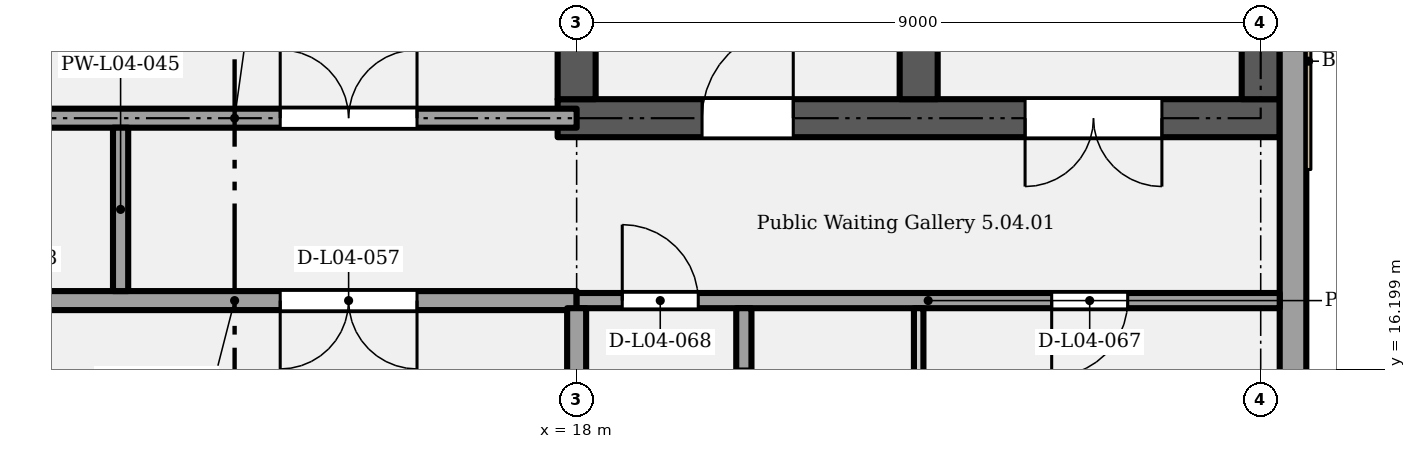
"""IFC4 building model, lengths in metres.
Left out: names, types, materials, properties, quantities, classifications, styles, units other than length and angle.
Written with IfcOpenShell. Run it as: python <this file> out.ifc"""

import sys

from ifc_helpers import new_model, si_unit, direction, frame, frame_2d, origin, place, context, subcontext, project, spatial, rectangle, extrude, element, fill, save


model = new_model("IFC4")
c1 = context("Model", 3, precision=1e-05, world=origin(), true_north=direction((0.0, 1.0)))
c2 = subcontext(c1, "Body", "Model", "MODEL_VIEW")
j1 = project(units=[si_unit("LENGTHUNIT", "METRE"), si_unit("PLANEANGLEUNIT", "RADIAN")], contexts=[c1])
p1 = place(None, origin())
s1 = spatial("IfcSite", under=j1, at=p1, CompositionType="ELEMENT")
p2 = place(p1, origin())
s2 = spatial("IfcBuilding", under=s1, at=p2, CompositionType="ELEMENT")
p3 = place(p2, frame((0.0, 0.0, 22.8)))
s3 = spatial("IfcBuildingStorey", under=s2, at=p3, CompositionType="ELEMENT", Elevation=22.8)
p4 = place(p3, frame((17.75, 19.5, 0.0), z_axis=(0.0, 0.0, 1.0), x_axis=(1.0, 0.0, 0.0)))
e1 = element("IfcWall", 1, at=p4, inside=s3, PredefinedType="SHEAR", context=c2, shape_type="SweptSolid", body=[
    extrude(rectangle(XDim=9.5, YDim=0.5, at=frame_2d((4.75, 0.0))), origin(), (0.0, 0.0, 1.0), 5.15),
])
p5 = place(p4, frame((1.9, 0.0, 0.0)))
e2 = element("IfcOpeningElement", 2, at=p5, cuts=e1, PredefinedType="OPENING", context=c2, shape_type="SweptSolid", body=[
    extrude(rectangle(XDim=1.2, YDim=2.1, at=frame_2d((0.6, 1.05))), frame((0.0, 0.26, 0.0), z_axis=(0.0, -1.0, 0.0), x_axis=(1.0, 0.0, 0.0)), (0.0, 0.0, 1.0), 0.52),
])
p6 = place(p4, frame((7.95, 0.0, 0.0), z_axis=(0.0, 0.0, 1.0), x_axis=(-1.0, 0.0, 0.0)))
e3 = element("IfcOpeningElement", 3, at=p6, cuts=e1, PredefinedType="OPENING", context=c2, shape_type="SweptSolid", body=[
    extrude(rectangle(XDim=1.8, YDim=2.1, at=frame_2d((0.9, 1.05))), frame((0.0, 0.26, 0.0), z_axis=(0.0, -1.0, 0.0), x_axis=(1.0, 0.0, 0.0)), (0.0, 0.0, 1.0), 0.52),
])
p7 = place(p3, frame((18.0, 19.75, 0.0), z_axis=(0.0, 0.0, 1.0), x_axis=(0.0, 1.0, 0.0)))
e4 = element("IfcWall", 4, at=p7, inside=s3, PredefinedType="SHEAR", context=c2, shape_type="SweptSolid", body=[
    extrude(rectangle(XDim=8.2, YDim=0.5, at=frame_2d((4.1, 0.0))), origin(), (0.0, 0.0, 1.0), 5.15),
])
p8 = place(p3, frame((22.5, 19.75, 0.0), z_axis=(0.0, 0.0, 1.0), x_axis=(0.0, 1.0, 0.0)))
e5 = element("IfcWall", 5, at=p8, inside=s3, PredefinedType="SHEAR", context=c2, shape_type="SweptSolid", body=[
    extrude(rectangle(XDim=8.5, YDim=0.5, at=frame_2d((4.25, 0.0))), origin(), (0.0, 0.0, 1.0), 5.15),
])
p9 = place(p3, frame((27.0, 19.75, 0.0), z_axis=(0.0, 0.0, 1.0), x_axis=(0.0, 1.0, 0.0)))
e6 = element("IfcWall", 6, at=p9, inside=s3, PredefinedType="SHEAR", context=c2, shape_type="SweptSolid", body=[
    extrude(rectangle(XDim=8.2, YDim=0.5, at=frame_2d((4.1, 0.0))), origin(), (0.0, 0.0, 1.0), 5.15),
])
p10 = place(p3, frame((27.425, 14.325, 0.0), z_axis=(0.0, 0.0, 1.0), x_axis=(0.0, 1.0, 0.0)))
e7 = element("IfcWall", 7, at=p10, inside=s3, PredefinedType="SOLIDWALL", context=c2, shape_type="SweptSolid", body=[
    extrude(rectangle(XDim=13.625, YDim=0.35, at=frame_2d((6.812, 0.0))), origin(), (0.0, 0.0, 1.0), 5.15),
])
p11 = place(p3, frame((9.0, 17.1, 0.0), z_axis=(0.0, 0.0, 1.0), x_axis=(1.0, 0.0, 0.0)))
e8 = element("IfcWall", 8, at=p11, inside=s3, PredefinedType="PARTITIONING", context=c2, shape_type="SweptSolid", body=[
    extrude(rectangle(XDim=9.0, YDim=0.25, at=frame_2d((4.5, 0.0))), origin(), (0.0, 0.0, 1.0), 5.15),
])
p12 = place(p11, frame((6.9, 0.0, 0.0), z_axis=(0.0, 0.0, 1.0), x_axis=(-1.0, 0.0, 0.0)))
e9 = element("IfcOpeningElement", 9, at=p12, cuts=e8, PredefinedType="OPENING", context=c2, shape_type="SweptSolid", body=[
    extrude(rectangle(XDim=1.8, YDim=2.4, at=frame_2d((0.9, 1.2))), frame((0.0, 0.135, 0.0), z_axis=(0.0, -1.0, 0.0), x_axis=(1.0, 0.0, 0.0)), (0.0, 0.0, 1.0), 0.27),
])
p13 = place(p11, frame((2.0, 0.0, 0.0), z_axis=(0.0, 0.0, 1.0), x_axis=(-1.0, 0.0, 0.0)))
e10 = element("IfcOpeningElement", 10, at=p13, cuts=e8, PredefinedType="OPENING", context=c2, shape_type="SweptSolid", body=[
    extrude(rectangle(XDim=1.0, YDim=2.1, at=frame_2d((0.5, 1.05))), frame((0.0, 0.135, 0.0), z_axis=(0.0, -1.0, 0.0), x_axis=(1.0, 0.0, 0.0)), (0.0, 0.0, 1.0), 0.27),
])
p14 = place(p3, frame((18.0, 17.1, 0.0), z_axis=(0.0, 0.0, 1.0), x_axis=(1.0, 0.0, 0.0)))
e11 = element("IfcWall", 11, at=p14, inside=s3, PredefinedType="PARTITIONING", context=c2, shape_type="SweptSolid", body=[
    extrude(rectangle(XDim=9.25, YDim=0.2, at=frame_2d((4.625, 0.0))), origin(), (0.0, 0.0, 1.0), 5.15),
])
p15 = place(p14, frame((7.25, 0.0, 0.0), z_axis=(0.0, 0.0, 1.0), x_axis=(-1.0, 0.0, 0.0)))
e12 = element("IfcOpeningElement", 12, at=p15, cuts=e11, PredefinedType="OPENING", context=c2, shape_type="SweptSolid", body=[
    extrude(rectangle(XDim=1.0, YDim=2.1, at=frame_2d((0.5, 1.05))), frame((0.0, 0.11, 0.0), z_axis=(0.0, -1.0, 0.0), x_axis=(1.0, 0.0, 0.0)), (0.0, 0.0, 1.0), 0.22),
])
p16 = place(p14, frame((0.6, 0.0, 0.0)))
e13 = element("IfcOpeningElement", 13, at=p16, cuts=e11, PredefinedType="OPENING", context=c2, shape_type="SweptSolid", body=[
    extrude(rectangle(XDim=1.0, YDim=2.1, at=frame_2d((0.5, 1.05))), frame((0.0, 0.11, 0.0), z_axis=(0.0, -1.0, 0.0), x_axis=(1.0, 0.0, 0.0)), (0.0, 0.0, 1.0), 0.22),
])
p17 = place(p3, frame((9.0, 19.5, 0.0), z_axis=(0.0, 0.0, 1.0), x_axis=(1.0, 0.0, 0.0)))
e14 = element("IfcWall", 14, at=p17, inside=s3, PredefinedType="PARTITIONING", context=c2, shape_type="SweptSolid", body=[
    extrude(rectangle(XDim=9.0, YDim=0.25, at=frame_2d((4.5, 0.0))), origin(), (0.0, 0.0, 1.0), 5.15),
])
p18 = place(p17, frame((5.1, 0.0, 0.0)))
e15 = element("IfcOpeningElement", 15, at=p18, cuts=e14, PredefinedType="OPENING", context=c2, shape_type="SweptSolid", body=[
    extrude(rectangle(XDim=1.8, YDim=2.4, at=frame_2d((0.9, 1.2))), frame((0.0, 0.135, 0.0), z_axis=(0.0, -1.0, 0.0), x_axis=(1.0, 0.0, 0.0)), (0.0, 0.0, 1.0), 0.27),
])
p19 = place(p17, frame((1.0, 0.0, 0.0)))
e16 = element("IfcOpeningElement", 16, at=p19, cuts=e14, PredefinedType="OPENING", context=c2, shape_type="SweptSolid", body=[
    extrude(rectangle(XDim=1.0, YDim=2.1, at=frame_2d((0.5, 1.05))), frame((0.0, 0.135, 0.0), z_axis=(0.0, -1.0, 0.0), x_axis=(1.0, 0.0, 0.0)), (0.0, 0.0, 1.0), 0.27),
])
p20 = place(p3, frame((12.0, 17.225, 0.0), z_axis=(0.0, 0.0, 1.0), x_axis=(0.0, 1.0, 0.0)))
e17 = element("IfcWall", 17, at=p20, inside=s3, PredefinedType="PARTITIONING", context=c2, shape_type="SweptSolid", body=[
    extrude(rectangle(XDim=2.15, YDim=0.2, at=frame_2d((1.075, 0.0))), origin(), (0.0, 0.0, 1.0), 5.15),
])
p21 = place(p3, frame((18.0, 12.55, 0.0), z_axis=(0.0, 0.0, 1.0), x_axis=(0.0, 1.0, 0.0)))
e18 = element("IfcWall", 18, at=p21, inside=s3, PredefinedType="PARTITIONING", context=c2, shape_type="SweptSolid", body=[
    extrude(rectangle(XDim=4.45, YDim=0.25, at=frame_2d((2.225, 0.0))), origin(), (0.0, 0.0, 1.0), 4.2),
])
p22 = place(p3, frame((20.2, 8.163, 0.0), z_axis=(0.0, 0.0, 1.0), x_axis=(0.0, 1.0, 0.0)))
e19 = element("IfcWall", 19, at=p22, inside=s3, PredefinedType="PARTITIONING", context=c2, shape_type="SweptSolid", body=[
    extrude(rectangle(XDim=8.837, YDim=0.2, at=frame_2d((4.419, 0.0))), origin(), (0.0, 0.0, 1.0), 5.15),
])
p23 = place(p22, frame((8.037, 0.0, 0.0), z_axis=(0.0, 0.0, 1.0), x_axis=(-1.0, 0.0, 0.0)))
e20 = element("IfcOpeningElement", 20, at=p23, cuts=e19, PredefinedType="OPENING", context=c2, shape_type="SweptSolid", body=[
    extrude(rectangle(XDim=0.9, YDim=2.1, at=frame_2d((0.45, 1.05))), frame((0.0, 0.11, 0.0), z_axis=(0.0, -1.0, 0.0), x_axis=(1.0, 0.0, 0.0)), (0.0, 0.0, 1.0), 0.22),
])
p24 = place(p22, frame((5.337, 0.0, 0.0), z_axis=(0.0, 0.0, 1.0), x_axis=(-1.0, 0.0, 0.0)))
e21 = element("IfcOpeningElement", 21, at=p24, cuts=e19, PredefinedType="OPENING", context=c2, shape_type="SweptSolid", body=[
    extrude(rectangle(XDim=0.9, YDim=2.1, at=frame_2d((0.45, 1.05))), frame((0.0, 0.11, 0.0), z_axis=(0.0, -1.0, 0.0), x_axis=(1.0, 0.0, 0.0)), (0.0, 0.0, 1.0), 0.22),
])
p25 = place(p22, frame((2.238, 0.0, 0.0), z_axis=(0.0, 0.0, 1.0), x_axis=(-1.0, 0.0, 0.0)))
e22 = element("IfcOpeningElement", 22, at=p25, cuts=e19, PredefinedType="OPENING", context=c2, shape_type="SweptSolid", body=[
    extrude(rectangle(XDim=1.0, YDim=2.1, at=frame_2d((0.5, 1.05))), frame((0.0, 0.11, 0.0), z_axis=(0.0, -1.0, 0.0), x_axis=(1.0, 0.0, 0.0)), (0.0, 0.0, 1.0), 0.22),
])
p26 = place(p3, frame((22.5, 8.163, 0.0), z_axis=(0.0, 0.0, 1.0), x_axis=(0.0, 1.0, 0.0)))
e23 = element("IfcWall", 23, at=p26, inside=s3, PredefinedType="PARTITIONING", context=c2, shape_type="SweptSolid", body=[
    extrude(rectangle(XDim=8.837, YDim=0.125, at=frame_2d((4.419, 0.0))), origin(), (0.0, 0.0, 1.0), 5.15),
])
p27 = place(p5, origin())
e24 = element("IfcDoor", 24, at=p27, inside=s3, OperationType="SINGLE_SWING_RIGHT", PredefinedType="DOOR", context=c2, shape_type="SweptSolid", body=[
    extrude(rectangle(XDim=1.2, YDim=2.1, at=frame_2d((0.6, 1.05))), frame((0.0, 0.025, 0.0), z_axis=(0.0, -1.0, 0.0), x_axis=(1.0, 0.0, 0.0)), (0.0, 0.0, 1.0), 0.05),
])
fill(e2, e24)
p28 = place(p6, origin())
e25 = element("IfcDoor", 25, at=p28, inside=s3, OperationType="DOUBLE_DOOR_SINGLE_SWING", PredefinedType="DOOR", context=c2, shape_type="SweptSolid", body=[
    extrude(rectangle(XDim=1.8, YDim=2.1, at=frame_2d((0.9, 1.05))), frame((0.0, 0.025, 0.0), z_axis=(0.0, -1.0, 0.0), x_axis=(1.0, 0.0, 0.0)), (0.0, 0.0, 1.0), 0.05),
])
fill(e3, e25)
p29 = place(p12, origin())
e26 = element("IfcDoor", 26, at=p29, inside=s3, OperationType="DOUBLE_DOOR_SINGLE_SWING", PredefinedType="DOOR", context=c2, shape_type="SweptSolid", body=[
    extrude(rectangle(XDim=1.8, YDim=2.4, at=frame_2d((0.9, 1.2))), frame((0.0, 0.025, 0.0), z_axis=(0.0, -1.0, 0.0), x_axis=(1.0, 0.0, 0.0)), (0.0, 0.0, 1.0), 0.05),
])
fill(e9, e26)
p30 = place(p18, origin())
e27 = element("IfcDoor", 27, at=p30, inside=s3, OperationType="DOUBLE_DOOR_SINGLE_SWING", PredefinedType="DOOR", context=c2, shape_type="SweptSolid", body=[
    extrude(rectangle(XDim=1.8, YDim=2.4, at=frame_2d((0.9, 1.2))), frame((0.0, 0.025, 0.0), z_axis=(0.0, -1.0, 0.0), x_axis=(1.0, 0.0, 0.0)), (0.0, 0.0, 1.0), 0.05),
])
fill(e15, e27)
p31 = place(p15, origin())
e28 = element("IfcDoor", 28, at=p31, inside=s3, OperationType="SINGLE_SWING_RIGHT", PredefinedType="DOOR", context=c2, shape_type="SweptSolid", body=[
    extrude(rectangle(XDim=1.0, YDim=2.1, at=frame_2d((0.5, 1.05))), frame((0.0, 0.025, 0.0), z_axis=(0.0, -1.0, 0.0), x_axis=(1.0, 0.0, 0.0)), (0.0, 0.0, 1.0), 0.05),
])
fill(e12, e28)
p32 = place(p16, origin())
e29 = element("IfcDoor", 29, at=p32, inside=s3, OperationType="SINGLE_SWING_LEFT", PredefinedType="DOOR", context=c2, shape_type="SweptSolid", body=[
    extrude(rectangle(XDim=1.0, YDim=2.1, at=frame_2d((0.5, 1.05))), frame((0.0, 0.025, 0.0), z_axis=(0.0, -1.0, 0.0), x_axis=(1.0, 0.0, 0.0)), (0.0, 0.0, 1.0), 0.05),
])
fill(e13, e29)
save(model, sys.argv[1])
